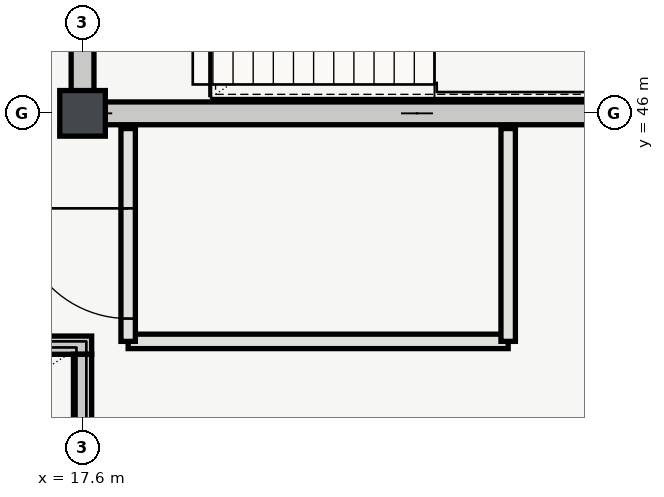
"""IFC4 building model, lengths in metres.
Left out: names, types, materials, properties, quantities, classifications, styles, units other than length and angle.
Written with IfcOpenShell. Run it as: python <this file> out.ifc"""

import sys

from ifc_helpers import new_model, si_unit, direction, frame, frame_2d, origin, origin_2d, place, context, subcontext, project, spatial, rectangle, extrude, element, fill, save


model = new_model("IFC4")
c1 = context("Model", 3, precision=1e-05, world=origin(), true_north=direction((0.0, 1.0)))
c2 = subcontext(c1, "Body", "Model", "MODEL_VIEW")
j1 = project(units=[si_unit("LENGTHUNIT", "METRE"), si_unit("PLANEANGLEUNIT", "RADIAN")], contexts=[c1])
p1 = place(None, origin())
s1 = spatial("IfcSite", under=j1, at=p1, CompositionType="ELEMENT")
p2 = place(p1, origin())
s2 = spatial("IfcBuilding", under=s1, at=p2, CompositionType="ELEMENT")
p3 = place(p2, frame((0.0, 0.0, 16.2)))
s3 = spatial("IfcBuildingStorey", under=s2, at=p3, CompositionType="ELEMENT", Elevation=16.2)
p4 = place(p3, frame((17.6, 46.0, 0.0), z_axis=(0.0, 0.0, 1.0), x_axis=(1.0, 0.0, 0.0)))
e1 = element("IfcColumn", 1, at=p4, inside=s3, PredefinedType="COLUMN", context=c2, shape_type="SweptSolid", body=[
    extrude(rectangle(XDim=0.6, YDim=0.6, at=origin_2d()), origin(), (0.0, 0.0, 1.0), 4.2),
])
p5 = place(p3, frame((17.45, 46.0, 0.0), z_axis=(0.0, 0.0, 1.0), x_axis=(1.0, 0.0, 0.0)))
e2 = element("IfcWall", 2, at=p5, inside=s3, PredefinedType="SHEAR", context=c2, shape_type="SweptSolid", body=[
    extrude(rectangle(XDim=9.1, YDim=0.3, at=frame_2d((4.55, 0.0))), origin(), (0.0, 0.0, 1.0), 3.92),
])
p6 = place(p3, frame((17.6, 46.15, 0.0), z_axis=(0.0, 0.0, 1.0), x_axis=(0.0, 1.0, 0.0)))
e3 = element("IfcWall", 3, at=p6, inside=s3, PredefinedType="SHEAR", context=c2, shape_type="SweptSolid", body=[
    extrude(rectangle(XDim=7.7, YDim=0.3, at=frame_2d((3.85, 0.0))), origin(), (0.0, 0.0, 1.0), 3.92),
])
p7 = place(p6, frame((1.65, 0.0, 0.0)))
e4 = element("IfcOpeningElement", 4, at=p7, cuts=e3, PredefinedType="OPENING", context=c2, shape_type="SweptSolid", body=[
    extrude(rectangle(XDim=1.4, YDim=2.2, at=frame_2d((0.7, 1.1))), frame((0.0, 0.16, 0.0), z_axis=(0.0, -1.0, 0.0), x_axis=(1.0, 0.0, 0.0)), (0.0, 0.0, 1.0), 0.32),
])
p8 = place(p3, frame((18.2, 43.0, 0.0), z_axis=(0.0, 0.0, 1.0), x_axis=(1.0, 0.0, 0.0)))
e5 = element("IfcWall", 5, at=p8, inside=s3, PredefinedType="PARTITIONING", context=c2, shape_type="SweptSolid", body=[
    extrude(rectangle(XDim=5.0, YDim=0.19, at=frame_2d((2.5, 0.0))), origin(), (0.0, 0.0, 1.0), 3.92),
])
p9 = place(p3, frame((18.2, 45.8, 0.0), z_axis=(0.0, 0.0, 1.0), x_axis=(0.0, -1.0, 0.0)))
e6 = element("IfcWall", 6, at=p9, inside=s3, PredefinedType="PARTITIONING", context=c2, shape_type="SweptSolid", body=[
    extrude(rectangle(XDim=2.8, YDim=0.19, at=frame_2d((1.4, 0.0))), origin(), (0.0, 0.0, 1.0), 3.92),
])
p10 = place(p9, frame((1.05, 0.0, 0.0)))
e7 = element("IfcOpeningElement", 7, at=p10, cuts=e6, PredefinedType="OPENING", context=c2, shape_type="SweptSolid", body=[
    extrude(rectangle(XDim=1.45, YDim=2.2, at=frame_2d((0.725, 1.1))), frame((0.0, 0.105, 0.0), z_axis=(0.0, -1.0, 0.0), x_axis=(1.0, 0.0, 0.0)), (0.0, 0.0, 1.0), 0.21),
])
p11 = place(p3, frame((23.2, 43.0, 0.0), z_axis=(0.0, 0.0, 1.0), x_axis=(0.0, 1.0, 0.0)))
e8 = element("IfcWall", 8, at=p11, inside=s3, PredefinedType="PARTITIONING", context=c2, shape_type="SweptSolid", body=[
    extrude(rectangle(XDim=2.8, YDim=0.19, at=frame_2d((1.4, 0.0))), origin(), (0.0, 0.0, 1.0), 3.92),
])
p12 = place(p3, frame((17.72, 42.95, 0.0), z_axis=(0.0, 0.0, 1.0), x_axis=(-1.0, 0.0, 0.0)))
e9 = element("IfcWall", 9, at=p12, inside=s3, PredefinedType="SHEAR", context=c2, shape_type="SweptSolid", body=[
    extrude(rectangle(XDim=9.04, YDim=0.24, at=frame_2d((4.52, 0.0))), origin(), (0.0, 0.0, 1.0), 3.95),
])
p13 = place(p3, frame((17.6, 38.67, 0.0), z_axis=(0.0, 0.0, 1.0), x_axis=(0.0, 1.0, 0.0)))
e10 = element("IfcWall", 10, at=p13, inside=s3, PredefinedType="SHEAR", context=c2, shape_type="SweptSolid", body=[
    extrude(rectangle(XDim=4.16, YDim=0.24, at=frame_2d((2.08, 0.0))), origin(), (0.0, 0.0, 1.0), 3.95),
])
p14 = place(p10, origin())
e11 = element("IfcDoor", 11, at=p14, inside=s3, OperationType="SINGLE_SWING_LEFT", PredefinedType="DOOR", context=c2, shape_type="SweptSolid", body=[
    extrude(rectangle(XDim=1.45, YDim=2.2, at=frame_2d((0.725, 1.1))), frame((0.0, 0.025, 0.0), z_axis=(0.0, -1.0, 0.0), x_axis=(1.0, 0.0, 0.0)), (0.0, 0.0, 1.0), 0.05),
])
fill(e7, e11)
save(model, sys.argv[1])
